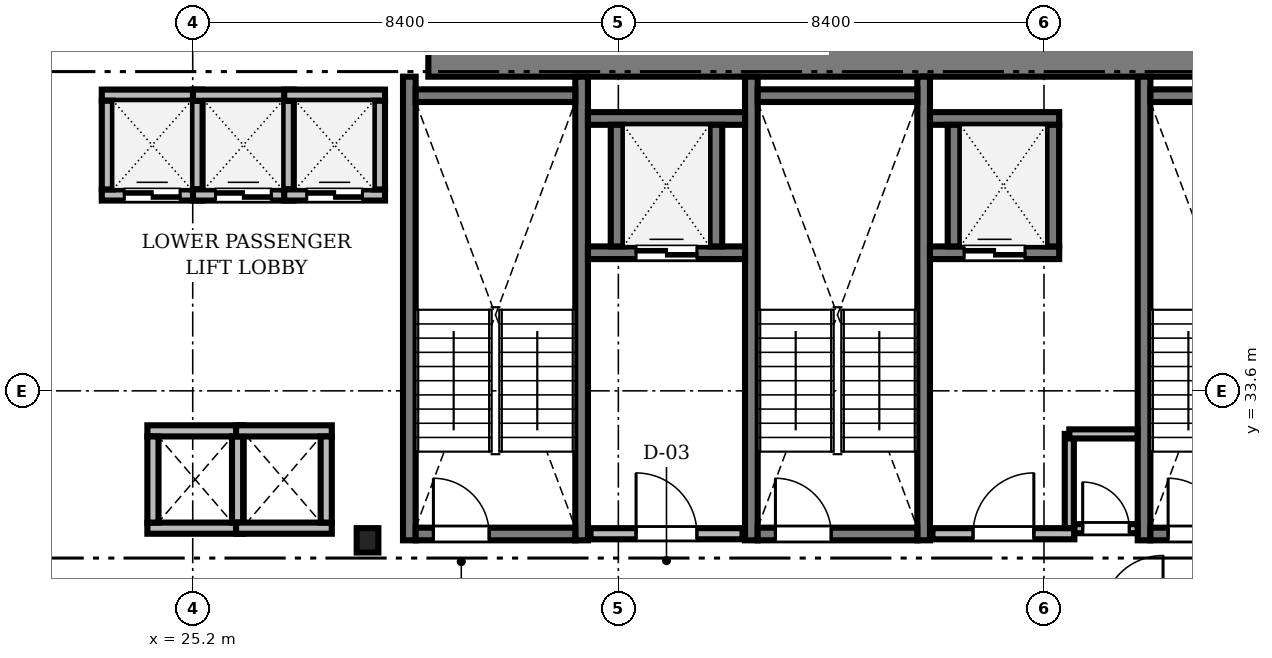
"""IFC4 building model, lengths in metres.
Left out: names, types, materials, properties, quantities, classifications, styles, units other than length and angle.
Written with IfcOpenShell. Run it as: python <this file> out.ifc"""

import sys

from ifc_helpers import new_model, si_unit, direction, frame, frame_2d, origin, origin_2d, place, context, subcontext, project, spatial, rectangle, i_section, extrude, source, transform, mapped, element, fill, save


model = new_model("IFC4")
c1 = context("Model", 3, precision=1e-05, world=origin(), true_north=direction((0.0, 1.0)))
c2 = subcontext(c1, "Body", "Model", "MODEL_VIEW")
j1 = project(units=[si_unit("LENGTHUNIT", "METRE"), si_unit("PLANEANGLEUNIT", "RADIAN")], contexts=[c1])
p1 = place(None, origin())
s1 = spatial("IfcSite", under=j1, at=p1, CompositionType="ELEMENT")
p2 = place(p1, origin())
s2 = spatial("IfcBuilding", under=s1, at=p2, CompositionType="ELEMENT")
p3 = place(p2, frame((0.0, 0.0, 67.75)))
s3 = spatial("IfcBuildingStorey", under=s2, at=p3, CompositionType="ELEMENT", Elevation=67.75)
m1 = source(origin(), c2, "Body", "SweptSolid", [
    extrude(rectangle(XDim=17.52, YDim=1.0, at=frame_2d((8.76, 0.0))), origin(), (0.0, 0.0, 1.0), 3.41),
])
p4 = place(p3, frame((29.85, 40.3, 0.0), z_axis=(0.0, 0.0, 1.0), x_axis=(1.0, 0.0, 0.0)))
e1 = element("IfcWall", 1, at=p4, inside=s3, PredefinedType="SHEAR", context=c2, shape_type="MappedRepresentation", body=[
    mapped(m1, transform((0.0, 0.0, 0.0), scale=1.0)),
])
m2 = source(origin(), c2, "Body", "SweptSolid", [
    extrude(i_section(OverallWidth=0.428, OverallDepth=0.481, WebThickness=0.04, FlangeThickness=0.063, FilletRadius=0.015, at=origin_2d()), origin(), (0.0, 0.0, 1.0), 3.41),
])
p5 = place(p3, frame((28.65, 30.65, 0.0), z_axis=(0.0, 0.0, 1.0), x_axis=(1.0, 0.0, 0.0)))
e2 = element("IfcColumn", 2, at=p5, inside=s3, PredefinedType="COLUMN", context=c2, shape_type="MappedRepresentation", body=[
    mapped(m2, transform((0.0, 0.0, 0.0), scale=1.0)),
])
m3 = source(origin(), c2, "Body", "SweptSolid", [
    extrude(rectangle(XDim=9.15, YDim=0.25, at=frame_2d((4.575, 0.0))), origin(), (0.0, 0.0, 1.0), 3.45),
])
for number, where, z_axis, x_axis in (
    (3, (29.475, 30.65, 0.0), (0.0, 0.0, 1.0), (0.0, 1.0, 0.0)),
    (4, (32.875, 30.65, 0.0), (0.0, 0.0, 1.0), (0.0, 1.0, 0.0)),
):
    element("IfcWall", number, at=place(p3, frame(where, z_axis=z_axis, x_axis=x_axis)), inside=s3, PredefinedType="SOLIDWALL", context=c2, shape_type="MappedRepresentation", body=[
        mapped(m3, transform((0.0, 0.0, 0.0), scale=1.0)),
    ])
m4 = source(origin(), c2, "Body", "SweptSolid", [
    extrude(rectangle(XDim=3.15, YDim=0.25, at=frame_2d((1.575, 0.0))), origin(), (0.0, 0.0, 1.0), 3.45),
])
p6 = place(p3, frame((29.6, 39.425, 0.0), z_axis=(0.0, 0.0, 1.0), x_axis=(1.0, 0.0, 0.0)))
e5 = element("IfcWall", 5, at=p6, inside=s3, PredefinedType="SOLIDWALL", context=c2, shape_type="MappedRepresentation", body=[
    mapped(m4, transform((0.0, 0.0, 0.0), scale=1.0)),
])
p7 = place(p3, frame((29.6, 30.775, 0.0), z_axis=(0.0, 0.0, 1.0), x_axis=(1.0, 0.0, 0.0)))
e6 = element("IfcWall", 6, at=p7, inside=s3, PredefinedType="SOLIDWALL", context=c2, shape_type="MappedRepresentation", body=[
    mapped(m4, transform((0.0, 0.0, 0.0), scale=1.0)),
])
m5 = source(origin(), c2, "Body", "SweptSolid", [
    extrude(rectangle(XDim=1.1, YDim=2.2, at=frame_2d((0.55, 1.1))), frame((0.0, 0.135, 0.0), z_axis=(0.0, -1.0, 0.0), x_axis=(1.0, 0.0, 0.0)), (0.0, 0.0, 1.0), 0.27),
])
p8 = place(p7, frame((0.35, 0.0, 0.0)))
e7 = element("IfcOpeningElement", 7, at=p8, cuts=e6, PredefinedType="OPENING", context=c2, shape_type="MappedRepresentation", body=[
    mapped(m5, transform((0.0, 0.0, 0.0), scale=1.0)),
])
for number, where, z_axis, x_axis in (
    (8, (36.225, 30.65, 0.0), (0.0, 0.0, 1.0), (0.0, 1.0, 0.0)),
    (9, (39.625, 30.65, 0.0), (0.0, 0.0, 1.0), (0.0, 1.0, 0.0)),
):
    element("IfcWall", number, at=place(p3, frame(where, z_axis=z_axis, x_axis=x_axis)), inside=s3, PredefinedType="SOLIDWALL", context=c2, shape_type="MappedRepresentation", body=[
        mapped(m3, transform((0.0, 0.0, 0.0), scale=1.0)),
    ])
p9 = place(p3, frame((36.35, 39.425, 0.0), z_axis=(0.0, 0.0, 1.0), x_axis=(1.0, 0.0, 0.0)))
e10 = element("IfcWall", 10, at=p9, inside=s3, PredefinedType="SOLIDWALL", context=c2, shape_type="MappedRepresentation", body=[
    mapped(m4, transform((0.0, 0.0, 0.0), scale=1.0)),
])
p10 = place(p3, frame((36.35, 30.775, 0.0), z_axis=(0.0, 0.0, 1.0), x_axis=(1.0, 0.0, 0.0)))
e11 = element("IfcWall", 11, at=p10, inside=s3, PredefinedType="SOLIDWALL", context=c2, shape_type="MappedRepresentation", body=[
    mapped(m4, transform((0.0, 0.0, 0.0), scale=1.0)),
])
p11 = place(p10, frame((0.35, 0.0, 0.0)))
e12 = element("IfcOpeningElement", 12, at=p11, cuts=e11, PredefinedType="OPENING", context=c2, shape_type="MappedRepresentation", body=[
    mapped(m5, transform((0.0, 0.0, 0.0), scale=1.0)),
])
p12 = place(p3, frame((43.975, 30.65, 0.0), z_axis=(0.0, 0.0, 1.0), x_axis=(0.0, 1.0, 0.0)))
e13 = element("IfcWall", 13, at=p12, inside=s3, PredefinedType="SOLIDWALL", context=c2, shape_type="MappedRepresentation", body=[
    mapped(m3, transform((0.0, 0.0, 0.0), scale=1.0)),
])
p13 = place(p3, frame((44.1, 39.425, 0.0), z_axis=(0.0, 0.0, 1.0), x_axis=(1.0, 0.0, 0.0)))
e14 = element("IfcWall", 14, at=p13, inside=s3, PredefinedType="SOLIDWALL", context=c2, shape_type="MappedRepresentation", body=[
    mapped(m4, transform((0.0, 0.0, 0.0), scale=1.0)),
])
p14 = place(p3, frame((44.1, 30.775, 0.0), z_axis=(0.0, 0.0, 1.0), x_axis=(1.0, 0.0, 0.0)))
e15 = element("IfcWall", 15, at=p14, inside=s3, PredefinedType="SOLIDWALL", context=c2, shape_type="MappedRepresentation", body=[
    mapped(m4, transform((0.0, 0.0, 0.0), scale=1.0)),
])
p15 = place(p14, frame((0.35, 0.0, 0.0)))
e16 = element("IfcOpeningElement", 16, at=p15, cuts=e15, PredefinedType="OPENING", context=c2, shape_type="MappedRepresentation", body=[
    mapped(m5, transform((0.0, 0.0, 0.0), scale=1.0)),
])
m6 = source(origin(), c2, "Body", "SweptSolid", [
    extrude(rectangle(XDim=3.0, YDim=0.22, at=frame_2d((1.5, 0.0))), origin(), (0.0, 0.0, 1.0), 3.41),
])
p16 = place(p3, frame((33.05, 30.78, 0.0), z_axis=(0.0, 0.0, 1.0), x_axis=(1.0, 0.0, 0.0)))
e17 = element("IfcWall", 17, at=p16, inside=s3, PredefinedType="SOLIDWALL", context=c2, shape_type="MappedRepresentation", body=[
    mapped(m6, transform((0.0, 0.0, 0.0), scale=1.0)),
])
m7 = source(origin(), c2, "Body", "SweptSolid", [
    extrude(rectangle(XDim=1.2, YDim=2.2, at=frame_2d((0.6, 1.1))), frame((0.0, 0.12, 0.0), z_axis=(0.0, -1.0, 0.0), x_axis=(1.0, 0.0, 0.0)), (0.0, 0.0, 1.0), 0.24),
])
p17 = place(p16, frame((0.9, 0.0, 0.0)))
e18 = element("IfcOpeningElement", 18, at=p17, cuts=e17, PredefinedType="OPENING", context=c2, shape_type="MappedRepresentation", body=[
    mapped(m7, transform((0.0, 0.0, 0.0), scale=1.0)),
])
m8 = source(origin(), c2, "Body", "SweptSolid", [
    extrude(rectangle(XDim=2.8, YDim=0.22, at=frame_2d((1.4, 0.0))), origin(), (0.0, 0.0, 1.0), 3.41),
])
p18 = place(p3, frame((39.8, 30.78, 0.0), z_axis=(0.0, 0.0, 1.0), x_axis=(1.0, 0.0, 0.0)))
e19 = element("IfcWall", 19, at=p18, inside=s3, PredefinedType="SOLIDWALL", context=c2, shape_type="MappedRepresentation", body=[
    mapped(m8, transform((0.0, 0.0, 0.0), scale=1.0)),
])
p19 = place(p18, frame((0.8, 0.0, 0.0)))
e20 = element("IfcOpeningElement", 20, at=p19, cuts=e19, PredefinedType="OPENING", context=c2, shape_type="MappedRepresentation", body=[
    mapped(m7, transform((0.0, 0.0, 0.0), scale=1.0)),
])
m9 = source(origin(), c2, "Body", "SweptSolid", [
    extrude(rectangle(XDim=1.99, YDim=0.22, at=frame_2d((0.995, 0.0))), origin(), (0.0, 0.0, 1.0), 3.41),
])
p20 = place(p3, frame((23.405, 37.465, 0.0), z_axis=(0.0, 0.0, 1.0), x_axis=(1.0, 0.0, 0.0)))
e21 = element("IfcWall", 21, at=p20, inside=s3, PredefinedType="SOLIDWALL", context=c2, shape_type="MappedRepresentation", body=[
    mapped(m9, transform((0.0, 0.0, 0.0), scale=1.0)),
])
m10 = source(origin(), c2, "Body", "SweptSolid", [
    extrude(rectangle(XDim=1.1, YDim=2.2, at=frame_2d((0.55, 1.1))), frame((0.0, 0.12, 0.0), z_axis=(0.0, -1.0, 0.0), x_axis=(1.0, 0.0, 0.0)), (0.0, 0.0, 1.0), 0.24),
])
p21 = place(p20, frame((0.445, 0.0, 0.0)))
e22 = element("IfcOpeningElement", 22, at=p21, cuts=e21, PredefinedType="OPENING", context=c2, shape_type="MappedRepresentation", body=[
    mapped(m10, transform((0.0, 0.0, 0.0), scale=1.0)),
])
p22 = place(p3, frame((23.405, 39.435, 0.0), z_axis=(0.0, 0.0, 1.0), x_axis=(1.0, 0.0, 0.0)))
e23 = element("IfcWall", 23, at=p22, inside=s3, PredefinedType="SOLIDWALL", context=c2, shape_type="MappedRepresentation", body=[
    mapped(m9, transform((0.0, 0.0, 0.0), scale=1.0)),
])
m11 = source(origin(), c2, "Body", "SweptSolid", [
    extrude(rectangle(XDim=1.75, YDim=0.22, at=frame_2d((0.875, 0.0))), origin(), (0.0, 0.0, 1.0), 3.41),
])
for number, where, z_axis, x_axis in (
    (24, (23.515, 37.575, 0.0), (0.0, 0.0, 1.0), (0.0, 1.0, 0.0)),
    (25, (25.285, 37.575, 0.0), (0.0, 0.0, 1.0), (0.0, 1.0, 0.0)),
):
    element("IfcWall", number, at=place(p3, frame(where, z_axis=z_axis, x_axis=x_axis)), inside=s3, PredefinedType="SOLIDWALL", context=c2, shape_type="MappedRepresentation", body=[
        mapped(m11, transform((0.0, 0.0, 0.0), scale=1.0)),
    ])
p23 = place(p3, frame((25.205, 37.465, 0.0), z_axis=(0.0, 0.0, 1.0), x_axis=(1.0, 0.0, 0.0)))
e26 = element("IfcWall", 26, at=p23, inside=s3, PredefinedType="SOLIDWALL", context=c2, shape_type="MappedRepresentation", body=[
    mapped(m9, transform((0.0, 0.0, 0.0), scale=1.0)),
])
p24 = place(p23, frame((0.445, 0.0, 0.0)))
e27 = element("IfcOpeningElement", 27, at=p24, cuts=e26, PredefinedType="OPENING", context=c2, shape_type="MappedRepresentation", body=[
    mapped(m10, transform((0.0, 0.0, 0.0), scale=1.0)),
])
p25 = place(p3, frame((25.205, 39.435, 0.0), z_axis=(0.0, 0.0, 1.0), x_axis=(1.0, 0.0, 0.0)))
e28 = element("IfcWall", 28, at=p25, inside=s3, PredefinedType="SOLIDWALL", context=c2, shape_type="MappedRepresentation", body=[
    mapped(m9, transform((0.0, 0.0, 0.0), scale=1.0)),
])
p26 = place(p3, frame((27.085, 37.575, 0.0), z_axis=(0.0, 0.0, 1.0), x_axis=(0.0, 1.0, 0.0)))
e29 = element("IfcWall", 29, at=p26, inside=s3, PredefinedType="SOLIDWALL", context=c2, shape_type="MappedRepresentation", body=[
    mapped(m11, transform((0.0, 0.0, 0.0), scale=1.0)),
])
m12 = source(origin(), c2, "Body", "SweptSolid", [
    extrude(rectangle(XDim=1.99, YDim=0.22, at=frame_2d((0.995, 0.0))), origin(), (0.0, 0.0, 1.0), 3.41),
])
p27 = place(p3, frame((27.005, 37.465, 0.0), z_axis=(0.0, 0.0, 1.0), x_axis=(1.0, 0.0, 0.0)))
e30 = element("IfcWall", 30, at=p27, inside=s3, PredefinedType="SOLIDWALL", context=c2, shape_type="MappedRepresentation", body=[
    mapped(m12, transform((0.0, 0.0, 0.0), scale=1.0)),
])
p28 = place(p27, frame((0.445, 0.0, 0.0)))
e31 = element("IfcOpeningElement", 31, at=p28, cuts=e30, PredefinedType="OPENING", context=c2, shape_type="MappedRepresentation", body=[
    mapped(m10, transform((0.0, 0.0, 0.0), scale=1.0)),
])
p29 = place(p3, frame((27.005, 39.435, 0.0), z_axis=(0.0, 0.0, 1.0), x_axis=(1.0, 0.0, 0.0)))
e32 = element("IfcWall", 32, at=p29, inside=s3, PredefinedType="SOLIDWALL", context=c2, shape_type="MappedRepresentation", body=[
    mapped(m12, transform((0.0, 0.0, 0.0), scale=1.0)),
])
p30 = place(p3, frame((28.885, 37.575, 0.0), z_axis=(0.0, 0.0, 1.0), x_axis=(0.0, 1.0, 0.0)))
e33 = element("IfcWall", 33, at=p30, inside=s3, PredefinedType="SOLIDWALL", context=c2, shape_type="MappedRepresentation", body=[
    mapped(m11, transform((0.0, 0.0, 0.0), scale=1.0)),
])
m13 = source(origin(), c2, "Body", "SweptSolid", [
    extrude(rectangle(XDim=3.1, YDim=0.25, at=frame_2d((1.55, 0.0))), origin(), (0.0, 0.0, 1.0), 3.41),
])
p31 = place(p3, frame((33.0, 36.325, 0.0), z_axis=(0.0, 0.0, 1.0), x_axis=(1.0, 0.0, 0.0)))
e34 = element("IfcWall", 34, at=p31, inside=s3, PredefinedType="SOLIDWALL", context=c2, shape_type="MappedRepresentation", body=[
    mapped(m13, transform((0.0, 0.0, 0.0), scale=1.0)),
])
m14 = source(origin(), c2, "Body", "SweptSolid", [
    extrude(rectangle(XDim=1.2, YDim=2.25, at=frame_2d((0.6, 1.125))), frame((0.0, 0.135, 0.0), z_axis=(0.0, -1.0, 0.0), x_axis=(1.0, 0.0, 0.0)), (0.0, 0.0, 1.0), 0.27),
])
p32 = place(p31, frame((0.95, 0.0, 0.0)))
e35 = element("IfcOpeningElement", 35, at=p32, cuts=e34, PredefinedType="OPENING", context=c2, shape_type="MappedRepresentation", body=[
    mapped(m14, transform((0.0, 0.0, 0.0), scale=1.0)),
])
p33 = place(p3, frame((33.0, 38.975, 0.0), z_axis=(0.0, 0.0, 1.0), x_axis=(1.0, 0.0, 0.0)))
e36 = element("IfcWall", 36, at=p33, inside=s3, PredefinedType="SOLIDWALL", context=c2, shape_type="MappedRepresentation", body=[
    mapped(m13, transform((0.0, 0.0, 0.0), scale=1.0)),
])
m15 = source(origin(), c2, "Body", "SweptSolid", [
    extrude(rectangle(XDim=2.4, YDim=0.25, at=frame_2d((1.2, 0.0))), origin(), (0.0, 0.0, 1.0), 3.41),
])
for number, where, z_axis, x_axis in (
    (37, (33.575, 36.45, 0.0), (0.0, 0.0, 1.0), (0.0, 1.0, 0.0)),
    (38, (35.525, 36.45, 0.0), (0.0, 0.0, 1.0), (0.0, 1.0, 0.0)),
):
    element("IfcWall", number, at=place(p3, frame(where, z_axis=z_axis, x_axis=x_axis)), inside=s3, PredefinedType="SOLIDWALL", context=c2, shape_type="MappedRepresentation", body=[
        mapped(m15, transform((0.0, 0.0, 0.0), scale=1.0)),
    ])
m16 = source(origin(), c2, "Body", "SweptSolid", [
    extrude(rectangle(XDim=2.55, YDim=0.25, at=frame_2d((1.275, 0.0))), origin(), (0.0, 0.0, 1.0), 3.41),
])
p34 = place(p3, frame((39.75, 36.325, 0.0), z_axis=(0.0, 0.0, 1.0), x_axis=(1.0, 0.0, 0.0)))
e39 = element("IfcWall", 39, at=p34, inside=s3, PredefinedType="SOLIDWALL", context=c2, shape_type="MappedRepresentation", body=[
    mapped(m16, transform((0.0, 0.0, 0.0), scale=1.0)),
])
p35 = place(p34, frame((0.675, 0.0, 0.0)))
e40 = element("IfcOpeningElement", 40, at=p35, cuts=e39, PredefinedType="OPENING", context=c2, shape_type="MappedRepresentation", body=[
    mapped(m14, transform((0.0, 0.0, 0.0), scale=1.0)),
])
p36 = place(p3, frame((39.75, 38.975, 0.0), z_axis=(0.0, 0.0, 1.0), x_axis=(1.0, 0.0, 0.0)))
e41 = element("IfcWall", 41, at=p36, inside=s3, PredefinedType="SOLIDWALL", context=c2, shape_type="MappedRepresentation", body=[
    mapped(m16, transform((0.0, 0.0, 0.0), scale=1.0)),
])
for number, where, z_axis, x_axis in (
    (42, (40.225, 36.45, 0.0), (0.0, 0.0, 1.0), (0.0, 1.0, 0.0)),
    (43, (42.175, 36.45, 0.0), (0.0, 0.0, 1.0), (0.0, 1.0, 0.0)),
):
    element("IfcWall", number, at=place(p3, frame(where, z_axis=z_axis, x_axis=x_axis)), inside=s3, PredefinedType="SOLIDWALL", context=c2, shape_type="MappedRepresentation", body=[
        mapped(m15, transform((0.0, 0.0, 0.0), scale=1.0)),
    ])
m17 = source(origin(), c2, "Body", "SweptSolid", [
    extrude(rectangle(XDim=1.89, YDim=0.22, at=frame_2d((0.945, 0.0))), origin(), (0.0, 0.0, 1.0), 3.41),
])
for number, where, z_axis, x_axis in (
    (44, (24.305, 30.89, 0.0), (0.0, 0.0, 1.0), (1.0, 0.0, 0.0)),
    (45, (24.305, 32.81, 0.0), (0.0, 0.0, 1.0), (1.0, 0.0, 0.0)),
):
    element("IfcWall", number, at=place(p3, frame(where, z_axis=z_axis, x_axis=x_axis)), inside=s3, PredefinedType="SOLIDWALL", context=c2, shape_type="MappedRepresentation", body=[
        mapped(m17, transform((0.0, 0.0, 0.0), scale=1.0)),
    ])
m18 = source(origin(), c2, "Body", "SweptSolid", [
    extrude(rectangle(XDim=1.7, YDim=0.22, at=frame_2d((0.85, 0.0))), origin(), (0.0, 0.0, 1.0), 3.41),
])
for number, where, z_axis, x_axis in (
    (46, (24.415, 31.0, 0.0), (0.0, 0.0, 1.0), (0.0, 1.0, 0.0)),
    (47, (26.085, 31.0, 0.0), (0.0, 0.0, 1.0), (0.0, 1.0, 0.0)),
):
    element("IfcWall", number, at=place(p3, frame(where, z_axis=z_axis, x_axis=x_axis)), inside=s3, PredefinedType="SOLIDWALL", context=c2, shape_type="MappedRepresentation", body=[
        mapped(m18, transform((0.0, 0.0, 0.0), scale=1.0)),
    ])
for number, where, z_axis, x_axis in (
    (48, (26.055, 30.89, 0.0), (0.0, 0.0, 1.0), (1.0, 0.0, 0.0)),
    (49, (26.055, 32.81, 0.0), (0.0, 0.0, 1.0), (1.0, 0.0, 0.0)),
):
    element("IfcWall", number, at=place(p3, frame(where, z_axis=z_axis, x_axis=x_axis)), inside=s3, PredefinedType="SOLIDWALL", context=c2, shape_type="MappedRepresentation", body=[
        mapped(m17, transform((0.0, 0.0, 0.0), scale=1.0)),
    ])
p37 = place(p3, frame((27.835, 31.0, 0.0), z_axis=(0.0, 0.0, 1.0), x_axis=(0.0, 1.0, 0.0)))
e50 = element("IfcWall", 50, at=p37, inside=s3, PredefinedType="SOLIDWALL", context=c2, shape_type="MappedRepresentation", body=[
    mapped(m18, transform((0.0, 0.0, 0.0), scale=1.0)),
])
m19 = source(origin(), c2, "Body", "SweptSolid", [
    extrude(rectangle(XDim=1.248, YDim=0.18, at=frame_2d((0.624, 0.0))), origin(), (0.0, 0.0, 1.0), 3.41),
])
p38 = place(p3, frame((42.6, 30.88, 0.0), z_axis=(0.0, 0.0, 1.0), x_axis=(1.0, 0.0, 0.0)))
e51 = element("IfcWall", 51, at=p38, inside=s3, PredefinedType="PARTITIONING", context=c2, shape_type="MappedRepresentation", body=[
    mapped(m19, transform((0.0, 0.0, 0.0), scale=1.0)),
])
m20 = source(origin(), c2, "Body", "SweptSolid", [
    extrude(rectangle(XDim=0.92, YDim=2.1, at=frame_2d((0.46, 1.05))), frame((0.0, 0.1, 0.0), z_axis=(0.0, -1.0, 0.0), x_axis=(1.0, 0.0, 0.0)), (0.0, 0.0, 1.0), 0.2),
])
p39 = place(p38, frame((0.164, 0.0, 0.0)))
e52 = element("IfcOpeningElement", 52, at=p39, cuts=e51, PredefinedType="OPENING", context=c2, shape_type="MappedRepresentation", body=[
    mapped(m20, transform((0.0, 0.0, 0.0), scale=1.0)),
])
m21 = source(origin(), c2, "Body", "SweptSolid", [
    extrude(rectangle(XDim=1.858, YDim=0.18, at=frame_2d((0.929, 0.0))), origin(), (0.0, 0.0, 1.0), 3.41),
])
p40 = place(p3, frame((42.5, 30.892, 0.0), z_axis=(0.0, 0.0, 1.0), x_axis=(0.0, 1.0, 0.0)))
e53 = element("IfcWall", 53, at=p40, inside=s3, PredefinedType="PARTITIONING", context=c2, shape_type="MappedRepresentation", body=[
    mapped(m21, transform((0.0, 0.0, 0.0), scale=1.0)),
])
m22 = source(origin(), c2, "Body", "SweptSolid", [
    extrude(rectangle(XDim=1.348, YDim=0.18, at=frame_2d((0.674, 0.0))), origin(), (0.0, 0.0, 1.0), 3.41),
])
p41 = place(p3, frame((42.5, 32.75, 0.0), z_axis=(0.0, 0.0, 1.0), x_axis=(1.0, 0.0, 0.0)))
e54 = element("IfcWall", 54, at=p41, inside=s3, PredefinedType="PARTITIONING", context=c2, shape_type="MappedRepresentation", body=[
    mapped(m22, transform((0.0, 0.0, 0.0), scale=1.0)),
])
m23 = source(origin(), c2, "Body", "SweptSolid", [
    extrude(rectangle(XDim=1.1, YDim=2.2, at=frame_2d((0.55, 1.1))), frame((0.0, 0.025, 0.0), z_axis=(0.0, -1.0, 0.0), x_axis=(1.0, 0.0, 0.0)), (0.0, 0.0, 1.0), 0.05),
])
p42 = place(p8, origin())
e55 = element("IfcDoor", 55, at=p42, inside=s3, OperationType="SINGLE_SWING_LEFT", PredefinedType="DOOR", context=c2, shape_type="MappedRepresentation", body=[
    mapped(m23, transform((0.0, 0.0, 0.0), scale=1.0)),
])
fill(e7, e55)
p43 = place(p11, origin())
e56 = element("IfcDoor", 56, at=p43, inside=s3, OperationType="SINGLE_SWING_LEFT", PredefinedType="DOOR", context=c2, shape_type="MappedRepresentation", body=[
    mapped(m23, transform((0.0, 0.0, 0.0), scale=1.0)),
])
fill(e12, e56)
p44 = place(p15, origin())
e57 = element("IfcDoor", 57, at=p44, inside=s3, OperationType="SINGLE_SWING_LEFT", PredefinedType="DOOR", context=c2, shape_type="MappedRepresentation", body=[
    mapped(m23, transform((0.0, 0.0, 0.0), scale=1.0)),
])
fill(e16, e57)
m24 = source(origin(), c2, "Body", "SweptSolid", [
    extrude(rectangle(XDim=1.2, YDim=2.2, at=frame_2d((0.6, 1.1))), frame((0.0, 0.025, 0.0), z_axis=(0.0, -1.0, 0.0), x_axis=(1.0, 0.0, 0.0)), (0.0, 0.0, 1.0), 0.05),
])
p45 = place(p17, origin())
e58 = element("IfcDoor", 58, at=p45, inside=s3, OperationType="SINGLE_SWING_LEFT", PredefinedType="DOOR", context=c2, shape_type="MappedRepresentation", body=[
    mapped(m24, transform((0.0, 0.0, 0.0), scale=1.0)),
])
fill(e18, e58)
p46 = place(p19, origin())
e59 = element("IfcDoor", 59, at=p46, inside=s3, OperationType="SINGLE_SWING_RIGHT", PredefinedType="DOOR", context=c2, shape_type="MappedRepresentation", body=[
    mapped(m24, transform((0.0, 0.0, 0.0), scale=1.0)),
])
fill(e20, e59)
p47 = place(p21, origin())
e60 = element("IfcDoor", 60, at=p47, inside=s3, OperationType="DOUBLE_DOOR_SLIDING", PredefinedType="DOOR", context=c2, shape_type="MappedRepresentation", body=[
    mapped(m23, transform((0.0, 0.0, 0.0), scale=1.0)),
])
fill(e22, e60)
p48 = place(p24, origin())
e61 = element("IfcDoor", 61, at=p48, inside=s3, OperationType="DOUBLE_DOOR_SLIDING", PredefinedType="DOOR", context=c2, shape_type="MappedRepresentation", body=[
    mapped(m23, transform((0.0, 0.0, 0.0), scale=1.0)),
])
fill(e27, e61)
p49 = place(p28, origin())
e62 = element("IfcDoor", 62, at=p49, inside=s3, OperationType="DOUBLE_DOOR_SLIDING", PredefinedType="DOOR", context=c2, shape_type="MappedRepresentation", body=[
    mapped(m23, transform((0.0, 0.0, 0.0), scale=1.0)),
])
fill(e31, e62)
m25 = source(origin(), c2, "Body", "SweptSolid", [
    extrude(rectangle(XDim=1.2, YDim=2.25, at=frame_2d((0.6, 1.125))), frame((0.0, 0.025, 0.0), z_axis=(0.0, -1.0, 0.0), x_axis=(1.0, 0.0, 0.0)), (0.0, 0.0, 1.0), 0.05),
])
p50 = place(p32, origin())
e63 = element("IfcDoor", 63, at=p50, inside=s3, OperationType="DOUBLE_DOOR_SLIDING", PredefinedType="DOOR", context=c2, shape_type="MappedRepresentation", body=[
    mapped(m25, transform((0.0, 0.0, 0.0), scale=1.0)),
])
fill(e35, e63)
p51 = place(p35, origin())
e64 = element("IfcDoor", 64, at=p51, inside=s3, OperationType="DOUBLE_DOOR_SLIDING", PredefinedType="DOOR", context=c2, shape_type="MappedRepresentation", body=[
    mapped(m25, transform((0.0, 0.0, 0.0), scale=1.0)),
])
fill(e40, e64)
m26 = source(origin(), c2, "Body", "SweptSolid", [
    extrude(rectangle(XDim=0.92, YDim=2.1, at=frame_2d((0.46, 1.05))), frame((0.0, 0.025, 0.0), z_axis=(0.0, -1.0, 0.0), x_axis=(1.0, 0.0, 0.0)), (0.0, 0.0, 1.0), 0.05),
])
p52 = place(p39, origin())
e65 = element("IfcDoor", 65, at=p52, inside=s3, OperationType="SINGLE_SWING_LEFT", PredefinedType="DOOR", context=c2, shape_type="MappedRepresentation", body=[
    mapped(m26, transform((0.0, 0.0, 0.0), scale=1.0)),
])
fill(e52, e65)
save(model, sys.argv[1])
